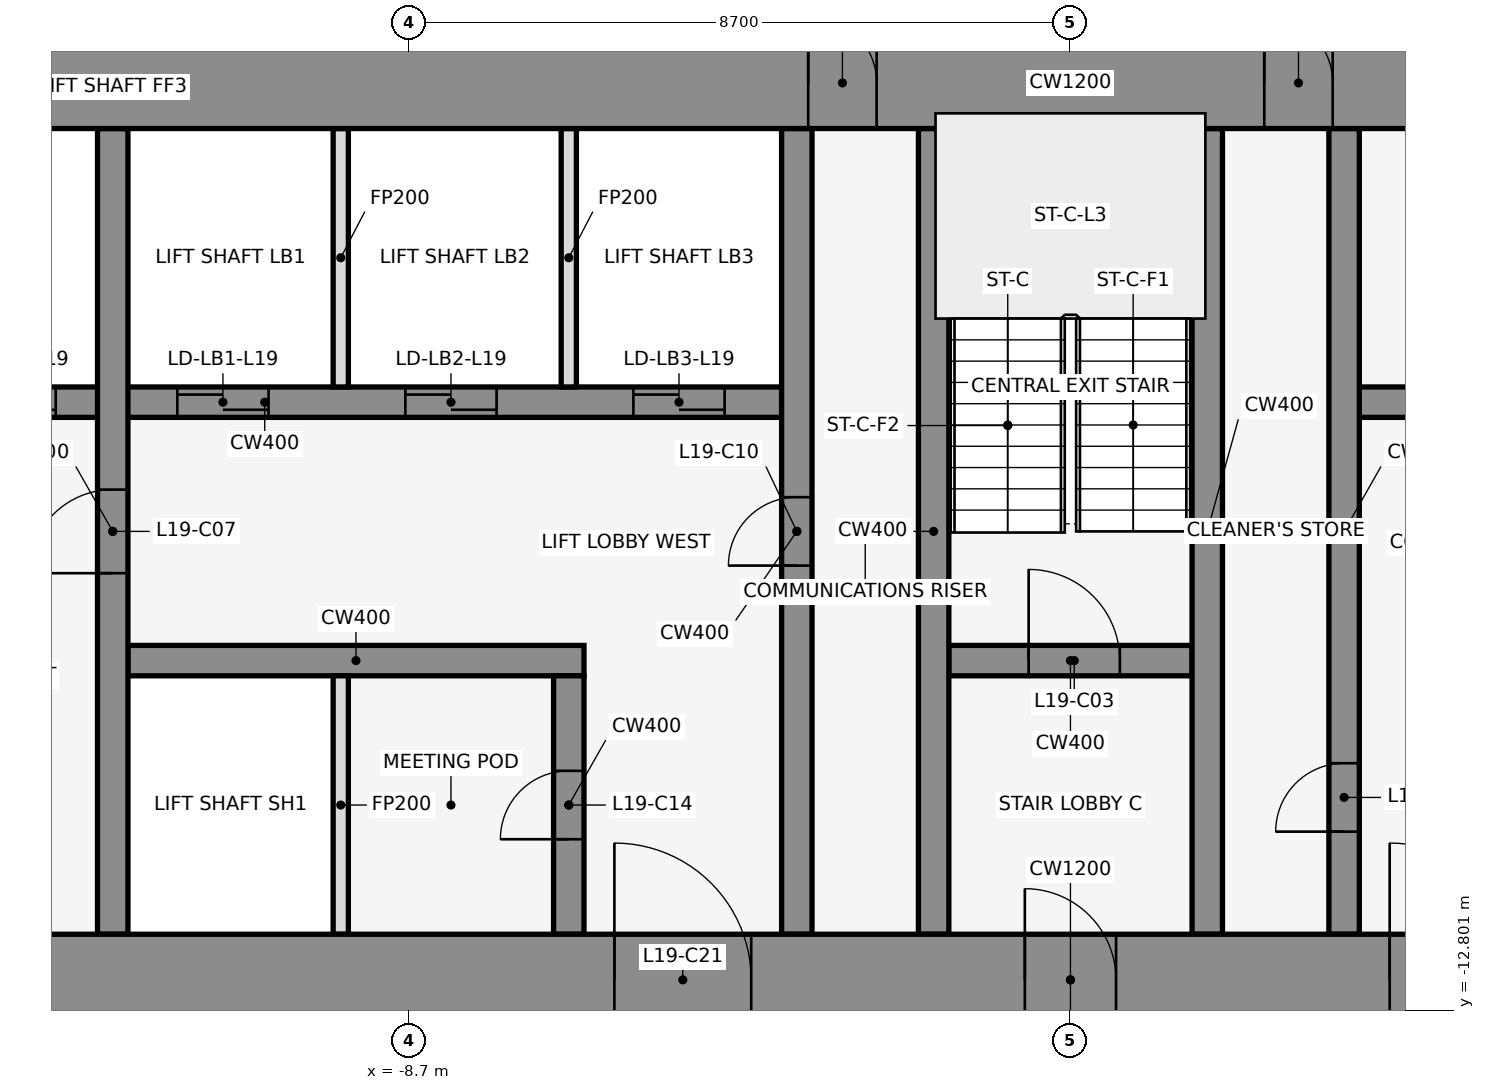
"""IFC4 building model, lengths in metres.
Left out: names, types, materials, properties, quantities, classifications, styles, units other than length and angle.
Written with IfcOpenShell. Run it as: python <this file> out.ifc"""

import sys

from ifc_helpers import new_model, si_unit, direction, frame, frame_2d, origin, place, context, subcontext, project, spatial, rectangle, extrude, element, fill, save


model = new_model("IFC4")
c1 = context("Model", 3, precision=1e-05, world=origin(), true_north=direction((0.0, 1.0)))
c2 = subcontext(c1, "Body", "Model", "MODEL_VIEW")
j1 = project(units=[si_unit("LENGTHUNIT", "METRE"), si_unit("PLANEANGLEUNIT", "RADIAN")], contexts=[c1])
p1 = place(None, origin())
s1 = spatial("IfcSite", under=j1, at=p1, CompositionType="ELEMENT")
p2 = place(p1, origin())
s2 = spatial("IfcBuilding", under=s1, at=p2, CompositionType="ELEMENT")
p3 = place(p2, frame((0.0, 0.0, 94.0)))
s3 = spatial("IfcBuildingStorey", under=s2, at=p3, CompositionType="ELEMENT", Elevation=94.0)
for number, where, z_axis, x_axis in (
    (1, (1.901, 1.08, 0.0), (0.0, 0.0, 1.0), (-0.84, -0.543, 0.0)),
    (2, (-0.068, -0.105, 0.0), (0.0, 0.0, 1.0), (-0.84, 0.543, 0.0)),
):
    element("IfcWall", number, at=place(p3, frame(where, z_axis=z_axis, x_axis=x_axis)), inside=s3, PredefinedType="STANDARD", context=c2, shape_type="SweptSolid", body=[
        extrude(rectangle(XDim=2.183, YDim=0.25, at=frame_2d((1.091, 0.0))), origin(), (0.0, 0.0, 1.0), 3.95),
    ])
p4 = place(p3, frame((-12.4, -8.2, 0.0), z_axis=(0.0, 0.0, 1.0), x_axis=(1.0, 0.0, 0.0)))
e3 = element("IfcWall", 3, at=p4, inside=s3, PredefinedType="SHEAR", context=c2, shape_type="SweptSolid", body=[
    extrude(rectangle(XDim=6.0, YDim=0.4, at=frame_2d((3.0, 0.0))), origin(), (0.0, 0.0, 1.0), 4.1),
])
p5 = place(p3, frame((-1.6, -8.2, 0.0), z_axis=(0.0, 0.0, 1.0), x_axis=(1.0, 0.0, 0.0)))
e4 = element("IfcWall", 4, at=p5, inside=s3, PredefinedType="SHEAR", context=c2, shape_type="SweptSolid", body=[
    extrude(rectangle(XDim=3.2, YDim=0.4, at=frame_2d((1.6, 0.0))), origin(), (0.0, 0.0, 1.0), 4.1),
])
p6 = place(p5, frame((1.05, 0.0, 0.0)))
e5 = element("IfcOpeningElement", 5, at=p6, cuts=e4, PredefinedType="OPENING", context=c2, shape_type="SweptSolid", body=[
    extrude(rectangle(XDim=1.2, YDim=2.1, at=frame_2d((0.6, 1.05))), frame((0.0, 0.212, 0.0), z_axis=(0.0, -1.0, 0.0), x_axis=(1.0, 0.0, 0.0)), (0.0, 0.0, 1.0), 0.424),
])
p7 = place(p3, frame((-17.4, -4.8, 0.0), z_axis=(0.0, 0.0, 1.0), x_axis=(1.0, 0.0, 0.0)))
e6 = element("IfcWall", 6, at=p7, inside=s3, PredefinedType="SHEAR", context=c2, shape_type="SweptSolid", body=[
    extrude(rectangle(XDim=13.6, YDim=0.4, at=frame_2d((6.8, 0.0))), origin(), (0.0, 0.0, 1.0), 4.1),
])
p8 = place(p7, frame((0.65, 0.0, 0.0)))
e7 = element("IfcOpeningElement", 7, at=p8, cuts=e6, PredefinedType="OPENING", context=c2, shape_type="SweptSolid", body=[
    extrude(rectangle(XDim=1.1, YDim=2.1, at=frame_2d((0.55, 1.05))), frame((0.0, 0.212, 0.0), z_axis=(0.0, -1.0, 0.0), x_axis=(1.0, 0.0, 0.0)), (0.0, 0.0, 1.0), 0.424),
])
p9 = place(p7, frame((2.95, 0.0, 0.0)))
e8 = element("IfcOpeningElement", 8, at=p9, cuts=e6, PredefinedType="OPENING", context=c2, shape_type="SweptSolid", body=[
    extrude(rectangle(XDim=1.1, YDim=2.1, at=frame_2d((0.55, 1.05))), frame((0.0, 0.212, 0.0), z_axis=(0.0, -1.0, 0.0), x_axis=(1.0, 0.0, 0.0)), (0.0, 0.0, 1.0), 0.424),
])
p10 = place(p7, frame((5.65, 0.0, 0.0)))
e9 = element("IfcOpeningElement", 9, at=p10, cuts=e6, PredefinedType="OPENING", context=c2, shape_type="SweptSolid", body=[
    extrude(rectangle(XDim=1.2, YDim=2.1, at=frame_2d((0.6, 1.05))), frame((0.0, 0.212, 0.0), z_axis=(0.0, -1.0, 0.0), x_axis=(1.0, 0.0, 0.0)), (0.0, 0.0, 1.0), 0.424),
])
p11 = place(p7, frame((8.65, 0.0, 0.0)))
e10 = element("IfcOpeningElement", 10, at=p11, cuts=e6, PredefinedType="OPENING", context=c2, shape_type="SweptSolid", body=[
    extrude(rectangle(XDim=1.2, YDim=2.1, at=frame_2d((0.6, 1.05))), frame((0.0, 0.212, 0.0), z_axis=(0.0, -1.0, 0.0), x_axis=(1.0, 0.0, 0.0)), (0.0, 0.0, 1.0), 0.424),
])
p12 = place(p7, frame((11.65, 0.0, 0.0)))
e11 = element("IfcOpeningElement", 11, at=p12, cuts=e6, PredefinedType="OPENING", context=c2, shape_type="SweptSolid", body=[
    extrude(rectangle(XDim=1.2, YDim=2.1, at=frame_2d((0.6, 1.05))), frame((0.0, 0.212, 0.0), z_axis=(0.0, -1.0, 0.0), x_axis=(1.0, 0.0, 0.0)), (0.0, 0.0, 1.0), 0.424),
])
p13 = place(p3, frame((3.8, -4.8, 0.0), z_axis=(0.0, 0.0, 1.0), x_axis=(1.0, 0.0, 0.0)))
e12 = element("IfcWall", 12, at=p13, inside=s3, PredefinedType="SHEAR", context=c2, shape_type="SweptSolid", body=[
    extrude(rectangle(XDim=13.6, YDim=0.4, at=frame_2d((6.8, 0.0))), origin(), (0.0, 0.0, 1.0), 4.1),
])
p14 = place(p13, frame((9.45, 0.0, 0.0)))
e13 = element("IfcOpeningElement", 13, at=p14, cuts=e12, PredefinedType="OPENING", context=c2, shape_type="SweptSolid", body=[
    extrude(rectangle(XDim=1.1, YDim=2.1, at=frame_2d((0.55, 1.05))), frame((0.0, 0.212, 0.0), z_axis=(0.0, -1.0, 0.0), x_axis=(1.0, 0.0, 0.0)), (0.0, 0.0, 1.0), 0.424),
])
p15 = place(p13, frame((11.85, 0.0, 0.0)))
e14 = element("IfcOpeningElement", 14, at=p15, cuts=e12, PredefinedType="OPENING", context=c2, shape_type="SweptSolid", body=[
    extrude(rectangle(XDim=1.1, YDim=2.1, at=frame_2d((0.55, 1.05))), frame((0.0, 0.212, 0.0), z_axis=(0.0, -1.0, 0.0), x_axis=(1.0, 0.0, 0.0)), (0.0, 0.0, 1.0), 0.424),
])
p16 = place(p13, frame((2.45, 0.0, 0.0)))
e15 = element("IfcOpeningElement", 15, at=p16, cuts=e12, PredefinedType="OPENING", context=c2, shape_type="SweptSolid", body=[
    extrude(rectangle(XDim=0.9, YDim=2.1, at=frame_2d((0.45, 1.05))), frame((0.0, 0.212, 0.0), z_axis=(0.0, -1.0, 0.0), x_axis=(1.0, 0.0, 0.0)), (0.0, 0.0, 1.0), 0.424),
])
p17 = place(p13, frame((6.85, 0.0, 0.0)))
e16 = element("IfcOpeningElement", 16, at=p17, cuts=e12, PredefinedType="OPENING", context=c2, shape_type="SweptSolid", body=[
    extrude(rectangle(XDim=0.9, YDim=2.1, at=frame_2d((0.45, 1.05))), frame((0.0, 0.212, 0.0), z_axis=(0.0, -1.0, 0.0), x_axis=(1.0, 0.0, 0.0)), (0.0, 0.0, 1.0), 0.424),
])
p18 = place(p3, frame((-12.6, -11.8, 0.0), z_axis=(0.0, 0.0, 1.0), x_axis=(0.0, 1.0, 0.0)))
e17 = element("IfcWall", 17, at=p18, inside=s3, PredefinedType="SHEAR", context=c2, shape_type="SweptSolid", body=[
    extrude(rectangle(XDim=10.6, YDim=0.4, at=frame_2d((5.3, 0.0))), origin(), (0.0, 0.0, 1.0), 4.1),
])
p19 = place(p18, frame((4.75, 0.0, 0.0)))
e18 = element("IfcOpeningElement", 18, at=p19, cuts=e17, PredefinedType="OPENING", context=c2, shape_type="SweptSolid", body=[
    extrude(rectangle(XDim=1.1, YDim=2.1, at=frame_2d((0.55, 1.05))), frame((0.0, 0.212, 0.0), z_axis=(0.0, -1.0, 0.0), x_axis=(1.0, 0.0, 0.0)), (0.0, 0.0, 1.0), 0.424),
])
for number, where, z_axis, x_axis in (
    (19, (-9.6, -11.8, 0.0), (0.0, 0.0, 1.0), (0.0, 1.0, 0.0)),
    (20, (-9.6, -4.6, 0.0), (0.0, 0.0, 1.0), (0.0, 1.0, 0.0)),
):
    element("IfcWall", number, at=place(p3, frame(where, z_axis=z_axis, x_axis=x_axis)), inside=s3, PredefinedType="PARTITIONING", context=c2, shape_type="SweptSolid", body=[
        extrude(rectangle(XDim=3.4, YDim=0.2, at=frame_2d((1.7, 0.0))), origin(), (0.0, 0.0, 1.0), 3.018),
    ])
p20 = place(p3, frame((-6.6, -11.8, 0.0), z_axis=(0.0, 0.0, 1.0), x_axis=(0.0, 1.0, 0.0)))
e21 = element("IfcWall", 21, at=p20, inside=s3, PredefinedType="SHEAR", context=c2, shape_type="SweptSolid", body=[
    extrude(rectangle(XDim=3.4, YDim=0.4, at=frame_2d((1.7, 0.0))), origin(), (0.0, 0.0, 1.0), 4.1),
])
p21 = place(p20, frame((1.25, 0.0, 0.0)))
e22 = element("IfcOpeningElement", 22, at=p21, cuts=e21, PredefinedType="OPENING", context=c2, shape_type="SweptSolid", body=[
    extrude(rectangle(XDim=0.9, YDim=2.1, at=frame_2d((0.45, 1.05))), frame((0.0, 0.212, 0.0), z_axis=(0.0, -1.0, 0.0), x_axis=(1.0, 0.0, 0.0)), (0.0, 0.0, 1.0), 0.424),
])
p22 = place(p3, frame((-6.6, -4.6, 0.0), z_axis=(0.0, 0.0, 1.0), x_axis=(0.0, 1.0, 0.0)))
e23 = element("IfcWall", 23, at=p22, inside=s3, PredefinedType="PARTITIONING", context=c2, shape_type="SweptSolid", body=[
    extrude(rectangle(XDim=3.4, YDim=0.2, at=frame_2d((1.7, 0.0))), origin(), (0.0, 0.0, 1.0), 3.018),
])
p23 = place(p3, frame((-3.6, -11.8, 0.0), z_axis=(0.0, 0.0, 1.0), x_axis=(0.0, 1.0, 0.0)))
e24 = element("IfcWall", 24, at=p23, inside=s3, PredefinedType="SHEAR", context=c2, shape_type="SweptSolid", body=[
    extrude(rectangle(XDim=10.6, YDim=0.4, at=frame_2d((5.3, 0.0))), origin(), (0.0, 0.0, 1.0), 4.1),
])
p24 = place(p23, frame((4.85, 0.0, 0.0)))
e25 = element("IfcOpeningElement", 25, at=p24, cuts=e24, PredefinedType="OPENING", context=c2, shape_type="SweptSolid", body=[
    extrude(rectangle(XDim=0.9, YDim=2.1, at=frame_2d((0.45, 1.05))), frame((0.0, 0.212, 0.0), z_axis=(0.0, -1.0, 0.0), x_axis=(1.0, 0.0, 0.0)), (0.0, 0.0, 1.0), 0.424),
])
for number, where, z_axis, x_axis in (
    (26, (-1.8, -11.8, 0.0), (0.0, 0.0, 1.0), (0.0, 1.0, 0.0)),
    (27, (1.8, -11.8, 0.0), (0.0, 0.0, 1.0), (0.0, 1.0, 0.0)),
):
    element("IfcWall", number, at=place(p3, frame(where, z_axis=z_axis, x_axis=x_axis)), inside=s3, PredefinedType="SHEAR", context=c2, shape_type="SweptSolid", body=[
        extrude(rectangle(XDim=10.6, YDim=0.4, at=frame_2d((5.3, 0.0))), origin(), (0.0, 0.0, 1.0), 4.1),
    ])
p25 = place(p3, frame((3.6, -11.8, 0.0), z_axis=(0.0, 0.0, 1.0), x_axis=(0.0, 1.0, 0.0)))
e28 = element("IfcWall", 28, at=p25, inside=s3, PredefinedType="SHEAR", context=c2, shape_type="SweptSolid", body=[
    extrude(rectangle(XDim=10.6, YDim=0.4, at=frame_2d((5.3, 0.0))), origin(), (0.0, 0.0, 1.0), 4.1),
])
p26 = place(p25, frame((1.35, 0.0, 0.0)))
e29 = element("IfcOpeningElement", 29, at=p26, cuts=e28, PredefinedType="OPENING", context=c2, shape_type="SweptSolid", body=[
    extrude(rectangle(XDim=0.9, YDim=2.1, at=frame_2d((0.45, 1.05))), frame((0.0, 0.212, 0.0), z_axis=(0.0, -1.0, 0.0), x_axis=(1.0, 0.0, 0.0)), (0.0, 0.0, 1.0), 0.424),
])
p27 = place(p3, frame((-22.0, -0.6, 0.0), z_axis=(0.0, 0.0, 1.0), x_axis=(1.0, 0.0, 0.0)))
e30 = element("IfcWall", 30, at=p27, inside=s3, PredefinedType="SHEAR", context=c2, shape_type="SweptSolid", body=[
    extrude(rectangle(XDim=44.0, YDim=1.2, at=frame_2d((22.0, 0.0))), origin(), (0.0, 0.0, 1.0), 4.1),
])
p28 = place(p27, frame((18.55, 0.0, 0.0)))
e31 = element("IfcOpeningElement", 31, at=p28, cuts=e30, PredefinedType="OPENING", context=c2, shape_type="SweptSolid", body=[
    extrude(rectangle(XDim=0.9, YDim=2.1, at=frame_2d((0.45, 1.05))), frame((0.0, 0.612, 0.0), z_axis=(0.0, -1.0, 0.0), x_axis=(1.0, 0.0, 0.0)), (0.0, 0.0, 1.0), 1.224),
])
p29 = place(p27, frame((24.55, 0.0, 0.0)))
e32 = element("IfcOpeningElement", 32, at=p29, cuts=e30, PredefinedType="OPENING", context=c2, shape_type="SweptSolid", body=[
    extrude(rectangle(XDim=0.9, YDim=2.1, at=frame_2d((0.45, 1.05))), frame((0.0, 0.612, 0.0), z_axis=(0.0, -1.0, 0.0), x_axis=(1.0, 0.0, 0.0)), (0.0, 0.0, 1.0), 1.224),
])
p30 = place(p3, frame((-22.0, -12.4, 0.0), z_axis=(0.0, 0.0, 1.0), x_axis=(1.0, 0.0, 0.0)))
e33 = element("IfcWall", 33, at=p30, inside=s3, PredefinedType="SHEAR", context=c2, shape_type="SweptSolid", body=[
    extrude(rectangle(XDim=44.0, YDim=1.2, at=frame_2d((22.0, 0.0))), origin(), (0.0, 0.0, 1.0), 4.1),
])
p31 = place(p30, frame((2.2, 0.0, 0.0)))
e34 = element("IfcOpeningElement", 34, at=p31, cuts=e33, PredefinedType="OPENING", context=c2, shape_type="SweptSolid", body=[
    extrude(rectangle(XDim=1.2, YDim=2.1, at=frame_2d((0.6, 1.05))), frame((0.0, 0.612, 0.0), z_axis=(0.0, -1.0, 0.0), x_axis=(1.0, 0.0, 0.0)), (0.0, 0.0, 1.0), 1.224),
])
p32 = place(p30, frame((21.4, 0.0, 0.0)))
e35 = element("IfcOpeningElement", 35, at=p32, cuts=e33, PredefinedType="OPENING", context=c2, shape_type="SweptSolid", body=[
    extrude(rectangle(XDim=1.2, YDim=2.1, at=frame_2d((0.6, 1.05))), frame((0.0, 0.612, 0.0), z_axis=(0.0, -1.0, 0.0), x_axis=(1.0, 0.0, 0.0)), (0.0, 0.0, 1.0), 1.224),
])
p33 = place(p30, frame((40.6, 0.0, 0.0)))
e36 = element("IfcOpeningElement", 36, at=p33, cuts=e33, PredefinedType="OPENING", context=c2, shape_type="SweptSolid", body=[
    extrude(rectangle(XDim=1.2, YDim=2.1, at=frame_2d((0.6, 1.05))), frame((0.0, 0.612, 0.0), z_axis=(0.0, -1.0, 0.0), x_axis=(1.0, 0.0, 0.0)), (0.0, 0.0, 1.0), 1.224),
])
p34 = place(p30, frame((16.0, 0.0, 0.0)))
e37 = element("IfcOpeningElement", 37, at=p34, cuts=e33, PredefinedType="OPENING", context=c2, shape_type="SweptSolid", body=[
    extrude(rectangle(XDim=1.8, YDim=2.1, at=frame_2d((0.9, 1.05))), frame((0.0, 0.612, 0.0), z_axis=(0.0, -1.0, 0.0), x_axis=(1.0, 0.0, 0.0)), (0.0, 0.0, 1.0), 1.224),
])
p35 = place(p30, frame((6.3, 0.0, 0.0)))
e38 = element("IfcOpeningElement", 38, at=p35, cuts=e33, PredefinedType="OPENING", context=c2, shape_type="SweptSolid", body=[
    extrude(rectangle(XDim=1.2, YDim=2.1, at=frame_2d((0.6, 1.05))), frame((0.0, 0.612, 0.0), z_axis=(0.0, -1.0, 0.0), x_axis=(1.0, 0.0, 0.0)), (0.0, 0.0, 1.0), 1.224),
])
p36 = place(p30, frame((26.2, 0.0, 0.0)))
e39 = element("IfcOpeningElement", 39, at=p36, cuts=e33, PredefinedType="OPENING", context=c2, shape_type="SweptSolid", body=[
    extrude(rectangle(XDim=1.8, YDim=2.1, at=frame_2d((0.9, 1.05))), frame((0.0, 0.612, 0.0), z_axis=(0.0, -1.0, 0.0), x_axis=(1.0, 0.0, 0.0)), (0.0, 0.0, 1.0), 1.224),
])
p37 = place(p30, frame((36.5, 0.0, 0.0)))
e40 = element("IfcOpeningElement", 40, at=p37, cuts=e33, PredefinedType="OPENING", context=c2, shape_type="SweptSolid", body=[
    extrude(rectangle(XDim=1.2, YDim=2.1, at=frame_2d((0.6, 1.05))), frame((0.0, 0.612, 0.0), z_axis=(0.0, -1.0, 0.0), x_axis=(1.0, 0.0, 0.0)), (0.0, 0.0, 1.0), 1.224),
])
p38 = place(p6, origin())
e41 = element("IfcDoor", 41, at=p38, inside=s3, OperationType="SINGLE_SWING_LEFT", PredefinedType="DOOR", context=c2, shape_type="SweptSolid", body=[
    extrude(rectangle(XDim=1.2, YDim=2.1, at=frame_2d((0.6, 1.05))), frame((0.0, 0.025, 0.0), z_axis=(0.0, -1.0, 0.0), x_axis=(1.0, 0.0, 0.0)), (0.0, 0.0, 1.0), 0.05),
])
fill(e5, e41)
p39 = place(p9, origin())
e42 = element("IfcDoor", 42, at=p39, inside=s3, OperationType="DOUBLE_DOOR_SLIDING", PredefinedType="DOOR", context=c2, shape_type="SweptSolid", body=[
    extrude(rectangle(XDim=1.1, YDim=2.1, at=frame_2d((0.55, 1.05))), frame((0.0, 0.025, 0.0), z_axis=(0.0, -1.0, 0.0), x_axis=(1.0, 0.0, 0.0)), (0.0, 0.0, 1.0), 0.05),
])
fill(e8, e42)
p40 = place(p10, origin())
e43 = element("IfcDoor", 43, at=p40, inside=s3, OperationType="DOUBLE_DOOR_SLIDING", PredefinedType="DOOR", context=c2, shape_type="SweptSolid", body=[
    extrude(rectangle(XDim=1.2, YDim=2.1, at=frame_2d((0.6, 1.05))), frame((0.0, 0.025, 0.0), z_axis=(0.0, -1.0, 0.0), x_axis=(1.0, 0.0, 0.0)), (0.0, 0.0, 1.0), 0.05),
])
fill(e9, e43)
p41 = place(p11, origin())
e44 = element("IfcDoor", 44, at=p41, inside=s3, OperationType="DOUBLE_DOOR_SLIDING", PredefinedType="DOOR", context=c2, shape_type="SweptSolid", body=[
    extrude(rectangle(XDim=1.2, YDim=2.1, at=frame_2d((0.6, 1.05))), frame((0.0, 0.025, 0.0), z_axis=(0.0, -1.0, 0.0), x_axis=(1.0, 0.0, 0.0)), (0.0, 0.0, 1.0), 0.05),
])
fill(e10, e44)
p42 = place(p12, origin())
e45 = element("IfcDoor", 45, at=p42, inside=s3, OperationType="DOUBLE_DOOR_SLIDING", PredefinedType="DOOR", context=c2, shape_type="SweptSolid", body=[
    extrude(rectangle(XDim=1.2, YDim=2.1, at=frame_2d((0.6, 1.05))), frame((0.0, 0.025, 0.0), z_axis=(0.0, -1.0, 0.0), x_axis=(1.0, 0.0, 0.0)), (0.0, 0.0, 1.0), 0.05),
])
fill(e11, e45)
p43 = place(p19, origin())
e46 = element("IfcDoor", 46, at=p43, inside=s3, OperationType="SINGLE_SWING_LEFT", PredefinedType="DOOR", context=c2, shape_type="SweptSolid", body=[
    extrude(rectangle(XDim=1.1, YDim=2.1, at=frame_2d((0.55, 1.05))), frame((0.0, 0.025, 0.0), z_axis=(0.0, -1.0, 0.0), x_axis=(1.0, 0.0, 0.0)), (0.0, 0.0, 1.0), 0.05),
])
fill(e18, e46)
p44 = place(p24, frame((0.9, 0.0, 0.0), z_axis=(0.0, 0.0, 1.0), x_axis=(-1.0, 0.0, 0.0)))
e47 = element("IfcDoor", 47, at=p44, inside=s3, OperationType="SINGLE_SWING_LEFT", PredefinedType="DOOR", context=c2, shape_type="SweptSolid", body=[
    extrude(rectangle(XDim=0.9, YDim=2.1, at=frame_2d((0.45, 1.05))), frame((0.0, 0.025, 0.0), z_axis=(0.0, -1.0, 0.0), x_axis=(1.0, 0.0, 0.0)), (0.0, 0.0, 1.0), 0.05),
])
fill(e25, e47)
p45 = place(p26, origin())
e48 = element("IfcDoor", 48, at=p45, inside=s3, OperationType="SINGLE_SWING_LEFT", PredefinedType="DOOR", context=c2, shape_type="SweptSolid", body=[
    extrude(rectangle(XDim=0.9, YDim=2.1, at=frame_2d((0.45, 1.05))), frame((0.0, 0.025, 0.0), z_axis=(0.0, -1.0, 0.0), x_axis=(1.0, 0.0, 0.0)), (0.0, 0.0, 1.0), 0.05),
])
fill(e29, e48)
p46 = place(p21, origin())
e49 = element("IfcDoor", 49, at=p46, inside=s3, OperationType="SINGLE_SWING_RIGHT", PredefinedType="DOOR", context=c2, shape_type="SweptSolid", body=[
    extrude(rectangle(XDim=0.9, YDim=2.1, at=frame_2d((0.45, 1.05))), frame((0.0, 0.025, 0.0), z_axis=(0.0, -1.0, 0.0), x_axis=(1.0, 0.0, 0.0)), (0.0, 0.0, 1.0), 0.05),
])
fill(e22, e49)
p47 = place(p28, origin())
e50 = element("IfcDoor", 50, at=p47, inside=s3, OperationType="SINGLE_SWING_LEFT", PredefinedType="DOOR", context=c2, shape_type="SweptSolid", body=[
    extrude(rectangle(XDim=0.9, YDim=2.1, at=frame_2d((0.45, 1.05))), frame((0.0, 0.025, 0.0), z_axis=(0.0, -1.0, 0.0), x_axis=(1.0, 0.0, 0.0)), (0.0, 0.0, 1.0), 0.05),
])
fill(e31, e50)
p48 = place(p29, origin())
e51 = element("IfcDoor", 51, at=p48, inside=s3, OperationType="SINGLE_SWING_LEFT", PredefinedType="DOOR", context=c2, shape_type="SweptSolid", body=[
    extrude(rectangle(XDim=0.9, YDim=2.1, at=frame_2d((0.45, 1.05))), frame((0.0, 0.025, 0.0), z_axis=(0.0, -1.0, 0.0), x_axis=(1.0, 0.0, 0.0)), (0.0, 0.0, 1.0), 0.05),
])
fill(e32, e51)
p49 = place(p32, frame((1.2, 0.0, 0.0), z_axis=(0.0, 0.0, 1.0), x_axis=(-1.0, 0.0, 0.0)))
e52 = element("IfcDoor", 52, at=p49, inside=s3, OperationType="SINGLE_SWING_RIGHT", PredefinedType="DOOR", context=c2, shape_type="SweptSolid", body=[
    extrude(rectangle(XDim=1.2, YDim=2.1, at=frame_2d((0.6, 1.05))), frame((0.0, 0.025, 0.0), z_axis=(0.0, -1.0, 0.0), x_axis=(1.0, 0.0, 0.0)), (0.0, 0.0, 1.0), 0.05),
])
fill(e35, e52)
p50 = place(p34, origin())
e53 = element("IfcDoor", 53, at=p50, inside=s3, OperationType="SINGLE_SWING_LEFT", PredefinedType="DOOR", context=c2, shape_type="SweptSolid", body=[
    extrude(rectangle(XDim=1.8, YDim=2.1, at=frame_2d((0.9, 1.05))), frame((0.0, 0.025, 0.0), z_axis=(0.0, -1.0, 0.0), x_axis=(1.0, 0.0, 0.0)), (0.0, 0.0, 1.0), 0.05),
])
fill(e37, e53)
p51 = place(p36, origin())
e54 = element("IfcDoor", 54, at=p51, inside=s3, OperationType="SINGLE_SWING_LEFT", PredefinedType="DOOR", context=c2, shape_type="SweptSolid", body=[
    extrude(rectangle(XDim=1.8, YDim=2.1, at=frame_2d((0.9, 1.05))), frame((0.0, 0.025, 0.0), z_axis=(0.0, -1.0, 0.0), x_axis=(1.0, 0.0, 0.0)), (0.0, 0.0, 1.0), 0.05),
])
fill(e39, e54)
save(model, sys.argv[1])
